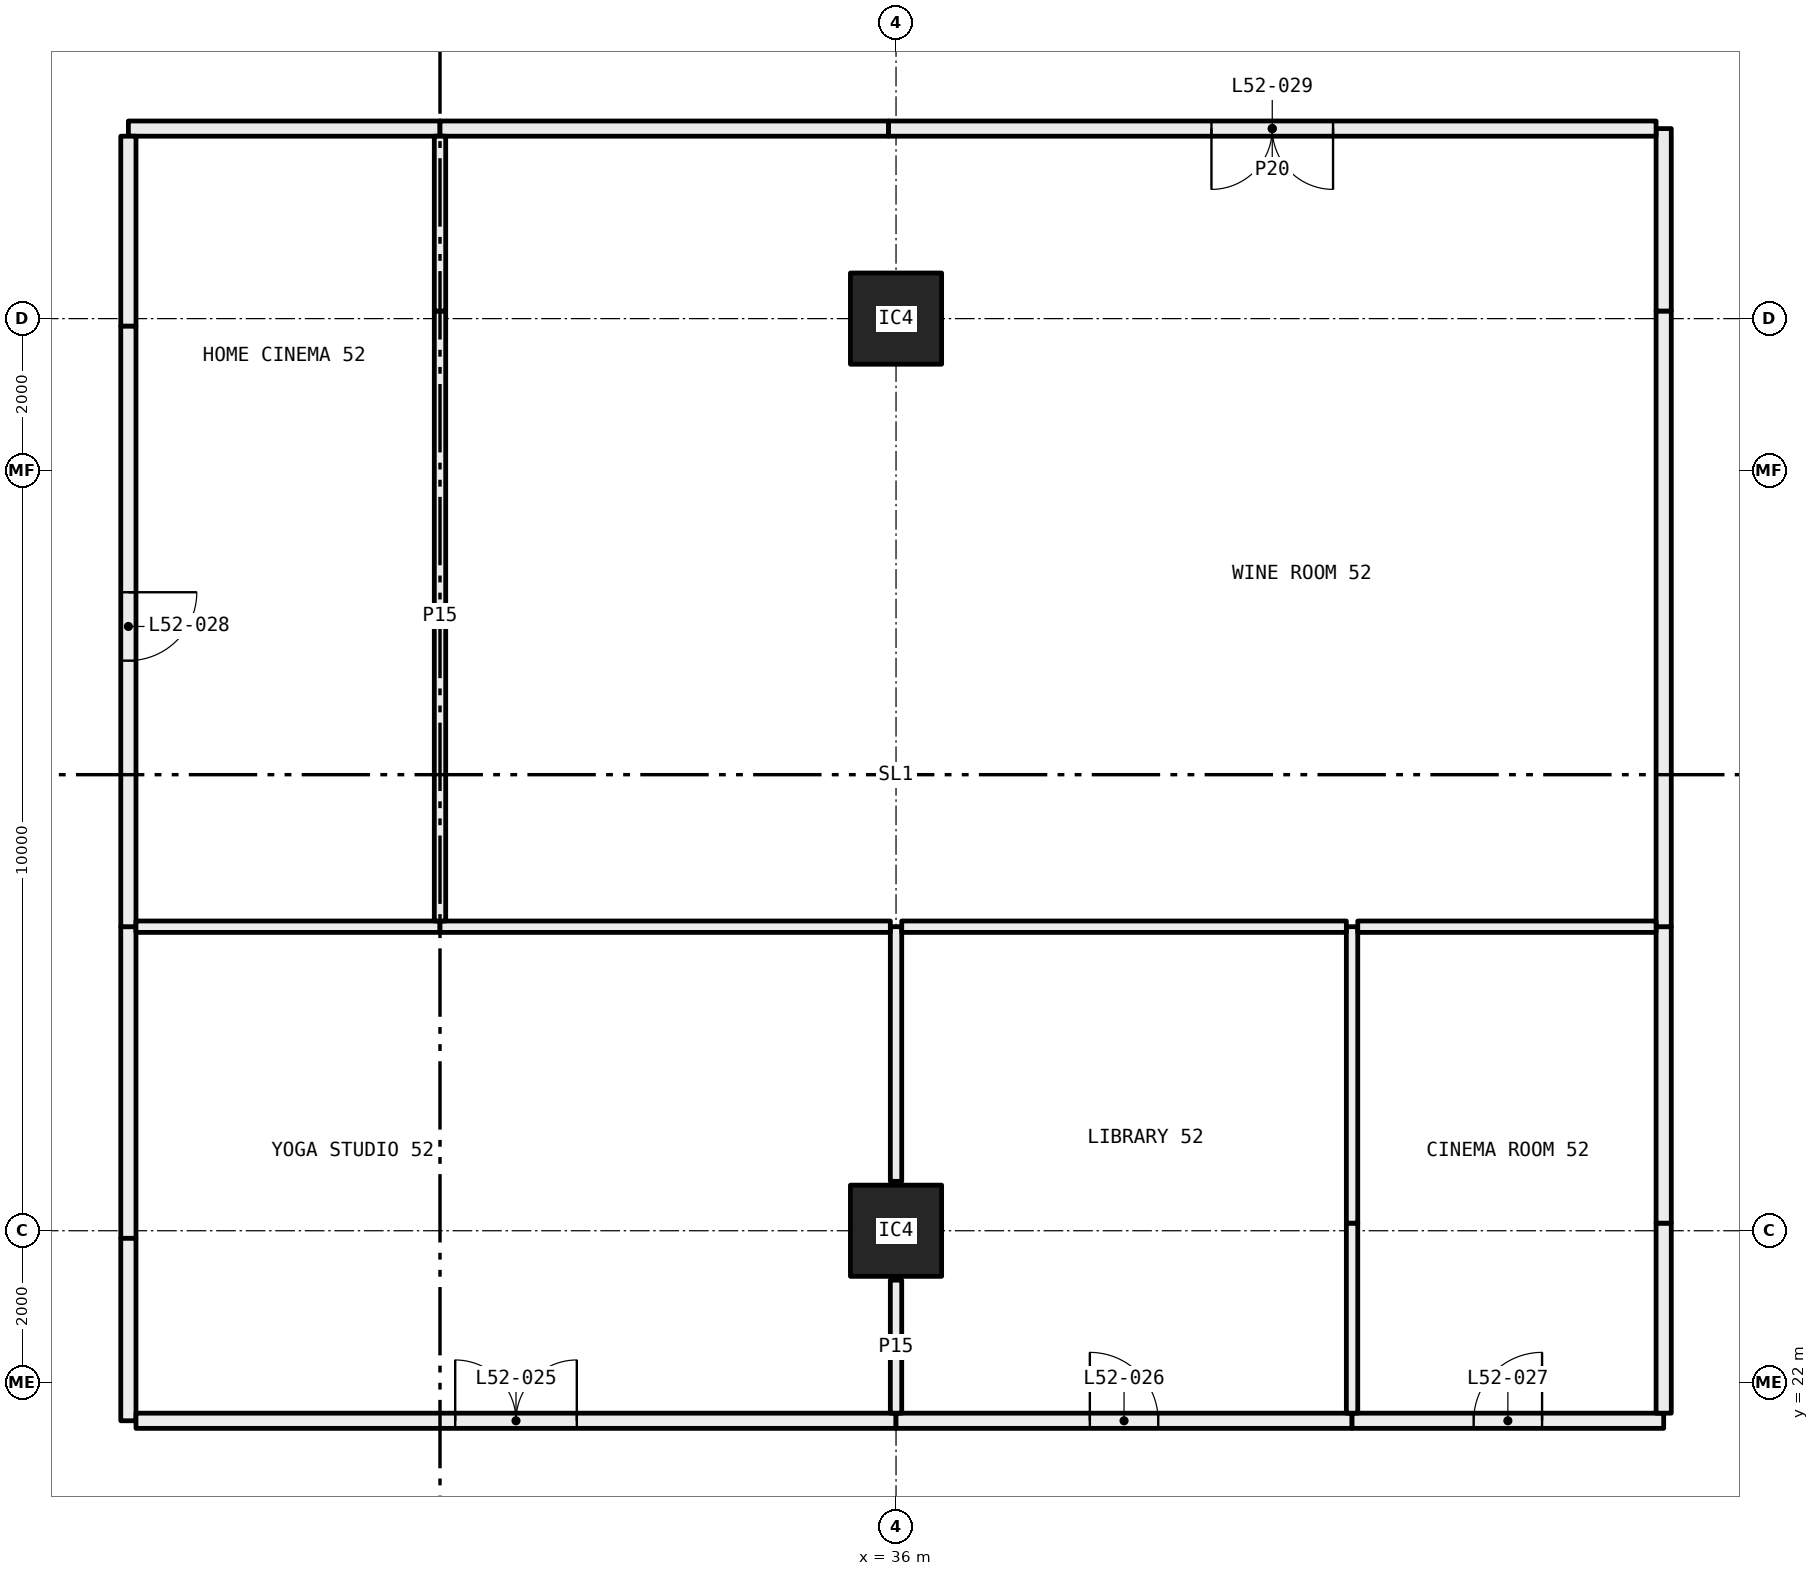
"""IFC4 building model, lengths in metres.
Left out: names, types, materials, properties, quantities, classifications, styles, units other than length and angle.
Written with IfcOpenShell. Run it as: python <this file> out.ifc"""

import sys

from ifc_helpers import new_model, si_unit, direction, frame, frame_2d, origin, origin_2d, place, context, subcontext, project, spatial, rectangle, hollow_rectangle, extrude, element, fill, save


model = new_model("IFC4")
c1 = context("Model", 3, precision=1e-05, world=origin(), true_north=direction((0.0, 1.0)))
c2 = subcontext(c1, "Body", "Model", "MODEL_VIEW")
j1 = project(units=[si_unit("LENGTHUNIT", "METRE"), si_unit("PLANEANGLEUNIT", "RADIAN")], contexts=[c1])
p1 = place(None, origin())
s1 = spatial("IfcSite", under=j1, at=p1, CompositionType="ELEMENT")
p2 = place(p1, origin())
s2 = spatial("IfcBuilding", under=s1, at=p2, CompositionType="ELEMENT")
p3 = place(p2, frame((0.0, 0.0, 196.2)))
s3 = spatial("IfcBuildingStorey", under=s2, at=p3, CompositionType="ELEMENT", Elevation=196.2)
for number, where, z_axis, x_axis in (
    (1, (36.0, 24.0, 0.0), (0.0, 0.0, 1.0), (1.0, 0.0, 0.0)),
    (2, (36.0, 36.0, 0.0), (0.0, 0.0, 1.0), (1.0, 0.0, 0.0)),
):
    element("IfcColumn", number, at=place(p3, frame(where, z_axis=z_axis, x_axis=x_axis)), inside=s3, PredefinedType="COLUMN", context=c2, shape_type="SweptSolid", body=[
        extrude(hollow_rectangle(XDim=1.2, YDim=1.2, WallThickness=0.05, at=origin_2d()), origin(), (0.0, 0.0, 1.0), 3.05),
    ])
p4 = place(p3, frame((25.9, 28.0, 0.0), z_axis=(0.0, 0.0, 1.0), x_axis=(0.0, -1.0, 0.0)))
e3 = element("IfcWall", 3, at=p4, inside=s3, PredefinedType="PARTITIONING", context=c2, shape_type="SweptSolid", body=[
    extrude(rectangle(XDim=4.1, YDim=0.2, at=frame_2d((2.05, 0.0))), origin(), (0.0, 0.0, 1.0), 2.45),
])
p5 = place(p3, frame((25.9, 23.9, 0.0), z_axis=(0.0, 0.0, 1.0), x_axis=(0.0, -1.0, 0.0)))
e4 = element("IfcWall", 4, at=p5, inside=s3, PredefinedType="PARTITIONING", context=c2, shape_type="SweptSolid", body=[
    extrude(rectangle(XDim=2.4, YDim=0.2, at=frame_2d((1.2, 0.0))), origin(), (0.0, 0.0, 1.0), 3.05),
])
p6 = place(p3, frame((26.0, 21.5, 0.0), z_axis=(0.0, 0.0, 1.0), x_axis=(1.0, 0.0, 0.0)))
e5 = element("IfcWall", 5, at=p6, inside=s3, PredefinedType="PARTITIONING", context=c2, shape_type="SweptSolid", body=[
    extrude(rectangle(XDim=10.0, YDim=0.2, at=frame_2d((5.0, 0.0))), origin(), (0.0, 0.0, 1.0), 2.45),
])
p7 = place(p6, frame((4.2, 0.0, 0.0)))
e6 = element("IfcOpeningElement", 6, at=p7, cuts=e5, PredefinedType="OPENING", context=c2, shape_type="SweptSolid", body=[
    extrude(rectangle(XDim=1.6, YDim=2.1, at=frame_2d((0.8, 1.05))), frame((0.0, 0.11, 0.0), z_axis=(0.0, -1.0, 0.0), x_axis=(1.0, 0.0, 0.0)), (0.0, 0.0, 1.0), 0.22),
])
p8 = place(p3, frame((36.0, 21.5, 0.0), z_axis=(0.0, 0.0, 1.0), x_axis=(1.0, 0.0, 0.0)))
e7 = element("IfcWall", 7, at=p8, inside=s3, PredefinedType="PARTITIONING", context=c2, shape_type="SweptSolid", body=[
    extrude(rectangle(XDim=6.0, YDim=0.2, at=frame_2d((3.0, 0.0))), origin(), (0.0, 0.0, 1.0), 2.45),
])
p9 = place(p8, frame((2.55, 0.0, 0.0)))
e8 = element("IfcOpeningElement", 8, at=p9, cuts=e7, PredefinedType="OPENING", context=c2, shape_type="SweptSolid", body=[
    extrude(rectangle(XDim=0.9, YDim=2.1, at=frame_2d((0.45, 1.05))), frame((0.0, 0.11, 0.0), z_axis=(0.0, -1.0, 0.0), x_axis=(1.0, 0.0, 0.0)), (0.0, 0.0, 1.0), 0.22),
])
p10 = place(p3, frame((42.0, 21.5, 0.0), z_axis=(0.0, 0.0, 1.0), x_axis=(1.0, 0.0, 0.0)))
e9 = element("IfcWall", 9, at=p10, inside=s3, PredefinedType="PARTITIONING", context=c2, shape_type="SweptSolid", body=[
    extrude(rectangle(XDim=4.1, YDim=0.2, at=frame_2d((2.05, 0.0))), origin(), (0.0, 0.0, 1.0), 3.05),
])
p11 = place(p10, frame((1.6, 0.0, 0.0)))
e10 = element("IfcOpeningElement", 10, at=p11, cuts=e9, PredefinedType="OPENING", context=c2, shape_type="SweptSolid", body=[
    extrude(rectangle(XDim=0.9, YDim=2.1, at=frame_2d((0.45, 1.05))), frame((0.0, 0.11, 0.0), z_axis=(0.0, -1.0, 0.0), x_axis=(1.0, 0.0, 0.0)), (0.0, 0.0, 1.0), 0.22),
])
p12 = place(p3, frame((46.1, 21.6, 0.0), z_axis=(0.0, 0.0, 1.0), x_axis=(0.0, 1.0, 0.0)))
e11 = element("IfcWall", 11, at=p12, inside=s3, PredefinedType="PARTITIONING", context=c2, shape_type="SweptSolid", body=[
    extrude(rectangle(XDim=2.5, YDim=0.2, at=frame_2d((1.25, 0.0))), origin(), (0.0, 0.0, 1.0), 2.45),
])
p13 = place(p3, frame((46.1, 24.1, 0.0), z_axis=(0.0, 0.0, 1.0), x_axis=(0.0, 1.0, 0.0)))
e12 = element("IfcWall", 12, at=p13, inside=s3, PredefinedType="PARTITIONING", context=c2, shape_type="SweptSolid", body=[
    extrude(rectangle(XDim=3.9, YDim=0.2, at=frame_2d((1.95, 0.0))), origin(), (0.0, 0.0, 1.0), 3.05),
])
p14 = place(p3, frame((30.0, 38.5, 0.0), z_axis=(0.0, 0.0, 1.0), x_axis=(-1.0, 0.0, 0.0)))
e13 = element("IfcWall", 13, at=p14, inside=s3, PredefinedType="PARTITIONING", context=c2, shape_type="SweptSolid", body=[
    extrude(rectangle(XDim=4.1, YDim=0.2, at=frame_2d((2.05, 0.0))), origin(), (0.0, 0.0, 1.0), 3.05),
])
p15 = place(p3, frame((25.9, 38.4, 0.0), z_axis=(0.0, 0.0, 1.0), x_axis=(0.0, -1.0, 0.0)))
e14 = element("IfcWall", 14, at=p15, inside=s3, PredefinedType="PARTITIONING", context=c2, shape_type="SweptSolid", body=[
    extrude(rectangle(XDim=2.5, YDim=0.2, at=frame_2d((1.25, 0.0))), origin(), (0.0, 0.0, 1.0), 2.45),
])
p16 = place(p3, frame((25.9, 35.9, 0.0), z_axis=(0.0, 0.0, 1.0), x_axis=(0.0, -1.0, 0.0)))
e15 = element("IfcWall", 15, at=p16, inside=s3, PredefinedType="PARTITIONING", context=c2, shape_type="SweptSolid", body=[
    extrude(rectangle(XDim=7.9, YDim=0.2, at=frame_2d((3.95, 0.0))), origin(), (0.0, 0.0, 1.0), 3.05),
])
p17 = place(p16, frame((3.5, 0.0, 0.0)))
e16 = element("IfcOpeningElement", 16, at=p17, cuts=e15, PredefinedType="OPENING", context=c2, shape_type="SweptSolid", body=[
    extrude(rectangle(XDim=0.9, YDim=2.1, at=frame_2d((0.45, 1.05))), frame((0.0, 0.11, 0.0), z_axis=(0.0, -1.0, 0.0), x_axis=(1.0, 0.0, 0.0)), (0.0, 0.0, 1.0), 0.22),
])
p18 = place(p3, frame((46.1, 28.0, 0.0), z_axis=(0.0, 0.0, 1.0), x_axis=(0.0, 1.0, 0.0)))
e17 = element("IfcWall", 17, at=p18, inside=s3, PredefinedType="PARTITIONING", context=c2, shape_type="SweptSolid", body=[
    extrude(rectangle(XDim=8.1, YDim=0.2, at=frame_2d((4.05, 0.0))), origin(), (0.0, 0.0, 1.0), 2.45),
])
p19 = place(p3, frame((46.1, 36.1, 0.0), z_axis=(0.0, 0.0, 1.0), x_axis=(0.0, 1.0, 0.0)))
e18 = element("IfcWall", 18, at=p19, inside=s3, PredefinedType="PARTITIONING", context=c2, shape_type="SweptSolid", body=[
    extrude(rectangle(XDim=2.4, YDim=0.2, at=frame_2d((1.2, 0.0))), origin(), (0.0, 0.0, 1.0), 3.05),
])
p20 = place(p3, frame((46.0, 38.5, 0.0), z_axis=(0.0, 0.0, 1.0), x_axis=(-1.0, 0.0, 0.0)))
e19 = element("IfcWall", 19, at=p20, inside=s3, PredefinedType="PARTITIONING", context=c2, shape_type="SweptSolid", body=[
    extrude(rectangle(XDim=10.1, YDim=0.2, at=frame_2d((5.05, 0.0))), origin(), (0.0, 0.0, 1.0), 2.45),
])
p21 = place(p20, frame((4.25, 0.0, 0.0)))
e20 = element("IfcOpeningElement", 20, at=p21, cuts=e19, PredefinedType="OPENING", context=c2, shape_type="SweptSolid", body=[
    extrude(rectangle(XDim=1.6, YDim=2.1, at=frame_2d((0.8, 1.05))), frame((0.0, 0.11, 0.0), z_axis=(0.0, -1.0, 0.0), x_axis=(1.0, 0.0, 0.0)), (0.0, 0.0, 1.0), 0.22),
])
p22 = place(p3, frame((35.9, 38.5, 0.0), z_axis=(0.0, 0.0, 1.0), x_axis=(-1.0, 0.0, 0.0)))
e21 = element("IfcWall", 21, at=p22, inside=s3, PredefinedType="PARTITIONING", context=c2, shape_type="SweptSolid", body=[
    extrude(rectangle(XDim=5.9, YDim=0.2, at=frame_2d((2.95, 0.0))), origin(), (0.0, 0.0, 1.0), 3.05),
])
p23 = place(p3, frame((36.0, 21.6, 0.0), z_axis=(0.0, 0.0, 1.0), x_axis=(0.0, 1.0, 0.0)))
e22 = element("IfcWall", 22, at=p23, inside=s3, PredefinedType="PARTITIONING", context=c2, shape_type="SweptSolid", body=[
    extrude(rectangle(XDim=1.75, YDim=0.15, at=frame_2d((0.875, 0.0))), origin(), (0.0, 0.0, 1.0), 2.45),
])
p24 = place(p3, frame((36.0, 24.65, 0.0), z_axis=(0.0, 0.0, 1.0), x_axis=(0.0, 1.0, 0.0)))
e23 = element("IfcWall", 23, at=p24, inside=s3, PredefinedType="PARTITIONING", context=c2, shape_type="SweptSolid", body=[
    extrude(rectangle(XDim=3.35, YDim=0.15, at=frame_2d((1.675, 0.0))), origin(), (0.0, 0.0, 1.0), 2.45),
])
p25 = place(p3, frame((30.0, 28.0, 0.0), z_axis=(0.0, 0.0, 1.0), x_axis=(-1.0, 0.0, 0.0)))
e24 = element("IfcWall", 24, at=p25, inside=s3, PredefinedType="PARTITIONING", context=c2, shape_type="SweptSolid", body=[
    extrude(rectangle(XDim=4.0, YDim=0.15, at=frame_2d((2.0, 0.0))), origin(), (0.0, 0.0, 1.0), 3.05),
])
p26 = place(p3, frame((35.925, 28.0, 0.0), z_axis=(0.0, 0.0, 1.0), x_axis=(-1.0, 0.0, 0.0)))
e25 = element("IfcWall", 25, at=p26, inside=s3, PredefinedType="PARTITIONING", context=c2, shape_type="SweptSolid", body=[
    extrude(rectangle(XDim=5.925, YDim=0.15, at=frame_2d((2.962, 0.0))), origin(), (0.0, 0.0, 1.0), 2.45),
])
p27 = place(p3, frame((42.0, 21.6, 0.0), z_axis=(0.0, 0.0, 1.0), x_axis=(0.0, 1.0, 0.0)))
e26 = element("IfcWall", 26, at=p27, inside=s3, PredefinedType="PARTITIONING", context=c2, shape_type="SweptSolid", body=[
    extrude(rectangle(XDim=2.5, YDim=0.15, at=frame_2d((1.25, 0.0))), origin(), (0.0, 0.0, 1.0), 2.45),
])
p28 = place(p3, frame((42.0, 24.1, 0.0), z_axis=(0.0, 0.0, 1.0), x_axis=(0.0, 1.0, 0.0)))
e27 = element("IfcWall", 27, at=p28, inside=s3, PredefinedType="PARTITIONING", context=c2, shape_type="SweptSolid", body=[
    extrude(rectangle(XDim=3.9, YDim=0.15, at=frame_2d((1.95, 0.0))), origin(), (0.0, 0.0, 1.0), 3.05),
])
p29 = place(p3, frame((41.925, 28.0, 0.0), z_axis=(0.0, 0.0, 1.0), x_axis=(-1.0, 0.0, 0.0)))
e28 = element("IfcWall", 28, at=p29, inside=s3, PredefinedType="PARTITIONING", context=c2, shape_type="SweptSolid", body=[
    extrude(rectangle(XDim=5.85, YDim=0.15, at=frame_2d((2.925, 0.0))), origin(), (0.0, 0.0, 1.0), 2.45),
])
p30 = place(p3, frame((46.0, 28.0, 0.0), z_axis=(0.0, 0.0, 1.0), x_axis=(-1.0, 0.0, 0.0)))
e29 = element("IfcWall", 29, at=p30, inside=s3, PredefinedType="PARTITIONING", context=c2, shape_type="SweptSolid", body=[
    extrude(rectangle(XDim=3.925, YDim=0.15, at=frame_2d((1.962, 0.0))), origin(), (0.0, 0.0, 1.0), 3.05),
])
p31 = place(p3, frame((30.0, 28.075, 0.0), z_axis=(0.0, 0.0, 1.0), x_axis=(0.0, 1.0, 0.0)))
e30 = element("IfcWall", 30, at=p31, inside=s3, PredefinedType="PARTITIONING", context=c2, shape_type="SweptSolid", body=[
    extrude(rectangle(XDim=8.025, YDim=0.15, at=frame_2d((4.013, 0.0))), origin(), (0.0, 0.0, 1.0), 2.45),
])
p32 = place(p3, frame((30.0, 36.1, 0.0), z_axis=(0.0, 0.0, 1.0), x_axis=(0.0, 1.0, 0.0)))
e31 = element("IfcWall", 31, at=p32, inside=s3, PredefinedType="PARTITIONING", context=c2, shape_type="SweptSolid", body=[
    extrude(rectangle(XDim=2.3, YDim=0.15, at=frame_2d((1.15, 0.0))), origin(), (0.0, 0.0, 1.0), 3.05),
])
p33 = place(p7, origin())
e32 = element("IfcDoor", 32, at=p33, inside=s3, OperationType="DOUBLE_DOOR_SINGLE_SWING", PredefinedType="DOOR", context=c2, shape_type="SweptSolid", body=[
    extrude(rectangle(XDim=1.6, YDim=2.1, at=frame_2d((0.8, 1.05))), frame((0.0, 0.025, 0.0), z_axis=(0.0, -1.0, 0.0), x_axis=(1.0, 0.0, 0.0)), (0.0, 0.0, 1.0), 0.05),
])
fill(e6, e32)
p34 = place(p9, origin())
e33 = element("IfcDoor", 33, at=p34, inside=s3, OperationType="SINGLE_SWING_RIGHT", PredefinedType="DOOR", context=c2, shape_type="SweptSolid", body=[
    extrude(rectangle(XDim=0.9, YDim=2.1, at=frame_2d((0.45, 1.05))), frame((0.0, 0.025, 0.0), z_axis=(0.0, -1.0, 0.0), x_axis=(1.0, 0.0, 0.0)), (0.0, 0.0, 1.0), 0.05),
])
fill(e8, e33)
p35 = place(p11, origin())
e34 = element("IfcDoor", 34, at=p35, inside=s3, OperationType="SINGLE_SWING_LEFT", PredefinedType="DOOR", context=c2, shape_type="SweptSolid", body=[
    extrude(rectangle(XDim=0.9, YDim=2.1, at=frame_2d((0.45, 1.05))), frame((0.0, 0.025, 0.0), z_axis=(0.0, -1.0, 0.0), x_axis=(1.0, 0.0, 0.0)), (0.0, 0.0, 1.0), 0.05),
])
fill(e10, e34)
p36 = place(p17, origin())
e35 = element("IfcDoor", 35, at=p36, inside=s3, OperationType="SINGLE_SWING_RIGHT", PredefinedType="DOOR", context=c2, shape_type="SweptSolid", body=[
    extrude(rectangle(XDim=0.9, YDim=2.1, at=frame_2d((0.45, 1.05))), frame((0.0, 0.025, 0.0), z_axis=(0.0, -1.0, 0.0), x_axis=(1.0, 0.0, 0.0)), (0.0, 0.0, 1.0), 0.05),
])
fill(e16, e35)
p37 = place(p21, origin())
e36 = element("IfcDoor", 36, at=p37, inside=s3, OperationType="DOUBLE_DOOR_SINGLE_SWING", PredefinedType="DOOR", context=c2, shape_type="SweptSolid", body=[
    extrude(rectangle(XDim=1.6, YDim=2.1, at=frame_2d((0.8, 1.05))), frame((0.0, 0.025, 0.0), z_axis=(0.0, -1.0, 0.0), x_axis=(1.0, 0.0, 0.0)), (0.0, 0.0, 1.0), 0.05),
])
fill(e20, e36)
save(model, sys.argv[1])
